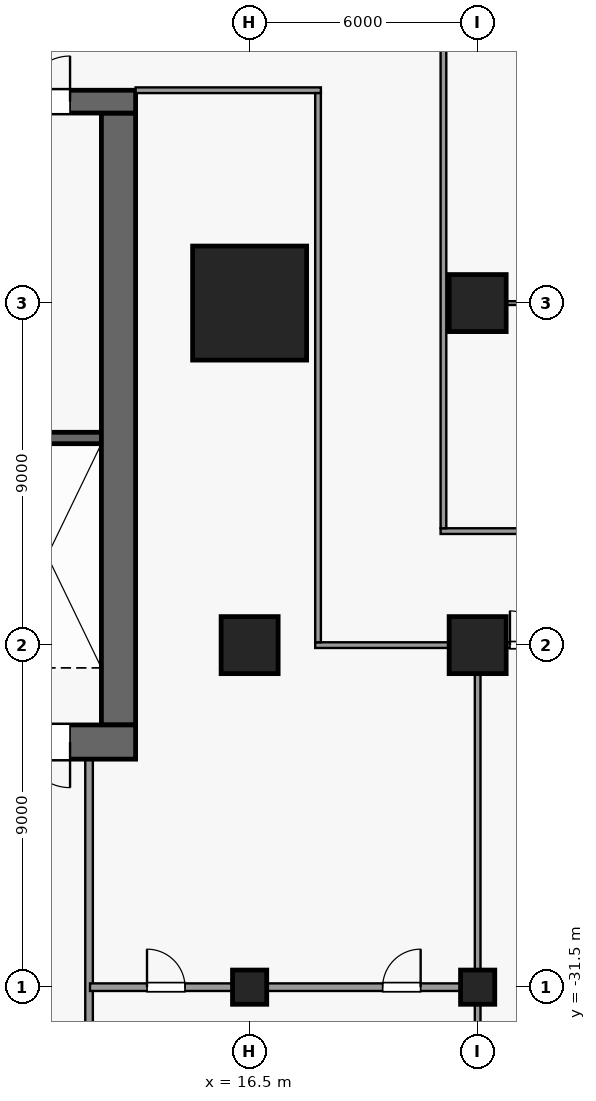
"""IFC4 building model, lengths in metres.
Left out: names, types, materials, properties, quantities, classifications, styles, units other than length and angle.
Written with IfcOpenShell. Run it as: python <this file> out.ifc"""

import sys

from ifc_helpers import new_model, si_unit, direction, frame, frame_2d, origin, origin_2d, place, context, subcontext, project, spatial, rectangle, extrude, element, fill, save


model = new_model("IFC4")
c1 = context("Model", 3, precision=1e-05, world=origin(), true_north=direction((0.0, 1.0)))
c2 = subcontext(c1, "Body", "Model", "MODEL_VIEW")
j1 = project(units=[si_unit("LENGTHUNIT", "METRE"), si_unit("PLANEANGLEUNIT", "RADIAN")], contexts=[c1])
p1 = place(None, origin())
s1 = spatial("IfcSite", under=j1, at=p1, CompositionType="ELEMENT")
p2 = place(p1, origin())
s2 = spatial("IfcBuilding", under=s1, at=p2, CompositionType="ELEMENT")
p3 = place(p2, origin())
s3 = spatial("IfcBuildingStorey", under=s2, at=p3, CompositionType="ELEMENT", Elevation=0.0)
p4 = place(p3, frame((16.5, -31.5, 0.0), z_axis=(0.0, 0.0, 1.0), x_axis=(1.0, 0.0, 0.0)))
e1 = element("IfcColumn", 1, at=p4, inside=s3, PredefinedType="COLUMN", context=c2, shape_type="SweptSolid", body=[
    extrude(rectangle(XDim=0.9, YDim=0.9, at=origin_2d()), origin(), (0.0, 0.0, 1.0), 8.0),
])
p5 = place(p3, frame((16.5, -22.5, 0.0), z_axis=(0.0, 0.0, 1.0), x_axis=(1.0, 0.0, 0.0)))
e2 = element("IfcColumn", 2, at=p5, inside=s3, PredefinedType="COLUMN", context=c2, shape_type="SweptSolid", body=[
    extrude(rectangle(XDim=1.5, YDim=1.5, at=origin_2d()), origin(), (0.0, 0.0, 1.0), 8.0),
])
p6 = place(p3, frame((16.5, -13.5, 0.0), z_axis=(0.0, 0.0, 1.0), x_axis=(1.0, 0.0, 0.0)))
e3 = element("IfcColumn", 3, at=p6, inside=s3, PredefinedType="COLUMN", context=c2, shape_type="SweptSolid", body=[
    extrude(rectangle(XDim=3.0, YDim=3.0, at=origin_2d()), origin(), (0.0, 0.0, 1.0), 8.0),
])
p7 = place(p3, frame((22.5, -31.5, 0.0), z_axis=(0.0, 0.0, 1.0), x_axis=(1.0, 0.0, 0.0)))
e4 = element("IfcColumn", 4, at=p7, inside=s3, PredefinedType="COLUMN", context=c2, shape_type="SweptSolid", body=[
    extrude(rectangle(XDim=0.9, YDim=0.9, at=origin_2d()), origin(), (0.0, 0.0, 1.0), 8.0),
])
for number, where, z_axis, x_axis in (
    (5, (22.5, -22.5, 0.0), (0.0, 0.0, 1.0), (1.0, 0.0, 0.0)),
    (6, (22.5, -13.5, 0.0), (0.0, 0.0, 1.0), (1.0, 0.0, 0.0)),
):
    element("IfcColumn", number, at=place(p3, frame(where, z_axis=z_axis, x_axis=x_axis)), inside=s3, PredefinedType="COLUMN", context=c2, shape_type="SweptSolid", body=[
        extrude(rectangle(XDim=1.5, YDim=1.5, at=origin_2d()), origin(), (0.0, 0.0, 1.0), 8.0),
    ])
p8 = place(p3, frame((13.5, -25.05, 0.0), z_axis=(0.0, 0.0, 1.0), x_axis=(-1.0, 0.0, 0.0)))
e7 = element("IfcWall", 7, at=p8, inside=s3, PredefinedType="SHEAR", context=c2, shape_type="SweptSolid", body=[
    extrude(rectangle(XDim=27.0, YDim=0.9, at=frame_2d((13.5, 0.0))), origin(), (0.0, 0.0, 1.0), 7.65),
])
p9 = place(p8, frame((24.075, 0.0, 0.0)))
e8 = element("IfcOpeningElement", 8, at=p9, cuts=e7, PredefinedType="OPENING", context=c2, shape_type="SweptSolid", body=[
    extrude(rectangle(XDim=1.2, YDim=2.1, at=frame_2d((0.6, 1.05))), frame((0.0, 0.46, 0.0), z_axis=(0.0, -1.0, 0.0), x_axis=(1.0, 0.0, 0.0)), (0.0, 0.0, 1.0), 0.92),
])
p10 = place(p8, frame((1.725, 0.0, 0.0)))
e9 = element("IfcOpeningElement", 9, at=p10, cuts=e7, PredefinedType="OPENING", context=c2, shape_type="SweptSolid", body=[
    extrude(rectangle(XDim=1.2, YDim=2.1, at=frame_2d((0.6, 1.05))), frame((0.0, 0.46, 0.0), z_axis=(0.0, -1.0, 0.0), x_axis=(1.0, 0.0, 0.0)), (0.0, 0.0, 1.0), 0.92),
])
p11 = place(p3, frame((-13.5, -8.2, 0.0), z_axis=(0.0, 0.0, 1.0), x_axis=(1.0, 0.0, 0.0)))
e10 = element("IfcWall", 10, at=p11, inside=s3, PredefinedType="SHEAR", context=c2, shape_type="SweptSolid", body=[
    extrude(rectangle(XDim=27.0, YDim=0.6, at=frame_2d((13.5, 0.0))), origin(), (0.0, 0.0, 1.0), 7.65),
])
p12 = place(p11, frame((7.8, 0.0, 0.0)))
e11 = element("IfcOpeningElement", 11, at=p12, cuts=e10, PredefinedType="OPENING", context=c2, shape_type="SweptSolid", body=[
    extrude(rectangle(XDim=1.8, YDim=2.1, at=frame_2d((0.9, 1.05))), frame((0.0, 0.31, 0.0), z_axis=(0.0, -1.0, 0.0), x_axis=(1.0, 0.0, 0.0)), (0.0, 0.0, 1.0), 0.62),
])
p13 = place(p11, frame((17.4, 0.0, 0.0)))
e12 = element("IfcOpeningElement", 12, at=p13, cuts=e10, PredefinedType="OPENING", context=c2, shape_type="SweptSolid", body=[
    extrude(rectangle(XDim=1.8, YDim=2.1, at=frame_2d((0.9, 1.05))), frame((0.0, 0.31, 0.0), z_axis=(0.0, -1.0, 0.0), x_axis=(1.0, 0.0, 0.0)), (0.0, 0.0, 1.0), 0.62),
])
p14 = place(p11, frame((2.725, 0.0, 0.0)))
e13 = element("IfcOpeningElement", 13, at=p14, cuts=e10, PredefinedType="OPENING", context=c2, shape_type="SweptSolid", body=[
    extrude(rectangle(XDim=0.9, YDim=2.1, at=frame_2d((0.45, 1.05))), frame((0.0, 0.31, 0.0), z_axis=(0.0, -1.0, 0.0), x_axis=(1.0, 0.0, 0.0)), (0.0, 0.0, 1.0), 0.62),
])
p15 = place(p11, frame((24.075, 0.0, 0.0)))
e14 = element("IfcOpeningElement", 14, at=p15, cuts=e10, PredefinedType="OPENING", context=c2, shape_type="SweptSolid", body=[
    extrude(rectangle(XDim=1.2, YDim=2.1, at=frame_2d((0.6, 1.05))), frame((0.0, 0.31, 0.0), z_axis=(0.0, -1.0, 0.0), x_axis=(1.0, 0.0, 0.0)), (0.0, 0.0, 1.0), 0.62),
])
p16 = place(p3, frame((13.05, -24.6, 0.0), z_axis=(0.0, 0.0, 1.0), x_axis=(0.0, 1.0, 0.0)))
e15 = element("IfcWall", 15, at=p16, inside=s3, PredefinedType="SHEAR", context=c2, shape_type="SweptSolid", body=[
    extrude(rectangle(XDim=16.1, YDim=0.9, at=frame_2d((8.05, 0.0))), origin(), (0.0, 0.0, 1.0), 7.65),
])
p17 = place(p3, frame((9.5, -17.05, 0.0), z_axis=(0.0, 0.0, 1.0), x_axis=(1.0, 0.0, 0.0)))
e16 = element("IfcWall", 16, at=p17, inside=s3, PredefinedType="SHEAR", context=c2, shape_type="SweptSolid", body=[
    extrude(rectangle(XDim=3.1, YDim=0.3, at=frame_2d((1.55, 0.0))), origin(), (0.0, 0.0, 1.0), 7.65),
])
p18 = place(p3, frame((12.275, -34.35, 0.0), z_axis=(0.0, 0.0, 1.0), x_axis=(0.0, 1.0, 0.0)))
e17 = element("IfcWall", 17, at=p18, inside=s3, PredefinedType="PARTITIONING", context=c2, shape_type="SweptSolid", body=[
    extrude(rectangle(XDim=8.85, YDim=0.2, at=frame_2d((4.425, 0.0))), origin(), (0.0, 0.0, 1.0), 7.65),
])
p19 = place(p18, frame((0.85, 0.0, 0.0)))
e18 = element("IfcOpeningElement", 18, at=p19, cuts=e17, PredefinedType="OPENING", context=c2, shape_type="SweptSolid", body=[
    extrude(rectangle(XDim=1.0, YDim=2.1, at=frame_2d((0.5, 1.05))), frame((0.0, 0.11, 0.0), z_axis=(0.0, -1.0, 0.0), x_axis=(1.0, 0.0, 0.0)), (0.0, 0.0, 1.0), 0.22),
])
p20 = place(p3, frame((18.225, -22.5, 0.0), z_axis=(0.0, 0.0, 1.0), x_axis=(1.0, 0.0, 0.0)))
e19 = element("IfcWall", 19, at=p20, inside=s3, PredefinedType="PARTITIONING", context=c2, shape_type="SweptSolid", body=[
    extrude(rectangle(XDim=3.525, YDim=0.15, at=frame_2d((1.762, 0.0))), origin(), (0.0, 0.0, 1.0), 7.65),
])
p21 = place(p3, frame((23.25, -22.5, 0.0), z_axis=(0.0, 0.0, 1.0), x_axis=(1.0, 0.0, 0.0)))
e20 = element("IfcWall", 20, at=p21, inside=s3, PredefinedType="PARTITIONING", context=c2, shape_type="SweptSolid", body=[
    extrude(rectangle(XDim=7.8, YDim=0.15, at=frame_2d((3.9, 0.0))), origin(), (0.0, 0.0, 1.0), 7.65),
])
p22 = place(p21, frame((0.1, 0.0, 0.0)))
e21 = element("IfcOpeningElement", 21, at=p22, cuts=e20, PredefinedType="OPENING", context=c2, shape_type="SweptSolid", body=[
    extrude(rectangle(XDim=1.8, YDim=2.1, at=frame_2d((0.9, 1.05))), frame((0.0, 0.085, 0.0), z_axis=(0.0, -1.0, 0.0), x_axis=(1.0, 0.0, 0.0)), (0.0, 0.0, 1.0), 0.17),
])
p23 = place(p3, frame((21.525, -19.5, 0.0), z_axis=(0.0, 0.0, 1.0), x_axis=(1.0, 0.0, 0.0)))
e22 = element("IfcWall", 22, at=p23, inside=s3, PredefinedType="PARTITIONING", context=c2, shape_type="SweptSolid", body=[
    extrude(rectangle(XDim=28.05, YDim=0.15, at=frame_2d((14.025, 0.0))), origin(), (0.0, 0.0, 1.0), 7.65),
])
p24 = place(p3, frame((13.5, -7.9, 0.0), z_axis=(0.0, 0.0, 1.0), x_axis=(1.0, 0.0, 0.0)))
e23 = element("IfcWall", 23, at=p24, inside=s3, PredefinedType="PARTITIONING", context=c2, shape_type="SweptSolid", body=[
    extrude(rectangle(XDim=4.875, YDim=0.15, at=frame_2d((2.438, 0.0))), origin(), (0.0, 0.0, 1.0), 7.65),
])
p25 = place(p3, frame((18.3, -22.425, 0.0), z_axis=(0.0, 0.0, 1.0), x_axis=(0.0, 1.0, 0.0)))
e24 = element("IfcWall", 24, at=p25, inside=s3, PredefinedType="PARTITIONING", context=c2, shape_type="SweptSolid", body=[
    extrude(rectangle(XDim=14.45, YDim=0.15, at=frame_2d((7.225, 0.0))), origin(), (0.0, 0.0, 1.0), 7.65),
])
p26 = place(p3, frame((21.6, -19.425, 0.0), z_axis=(0.0, 0.0, 1.0), x_axis=(0.0, 1.0, 0.0)))
e25 = element("IfcWall", 25, at=p26, inside=s3, PredefinedType="PARTITIONING", context=c2, shape_type="SweptSolid", body=[
    extrude(rectangle(XDim=13.75, YDim=0.15, at=frame_2d((6.875, 0.0))), origin(), (0.0, 0.0, 1.0), 7.65),
])
p27 = place(p3, frame((22.5, -34.225, 0.0), z_axis=(0.0, 0.0, 1.0), x_axis=(0.0, 1.0, 0.0)))
e26 = element("IfcWall", 26, at=p27, inside=s3, PredefinedType="PARTITIONING", context=c2, shape_type="SweptSolid", body=[
    extrude(rectangle(XDim=2.275, YDim=0.15, at=frame_2d((1.138, 0.0))), origin(), (0.0, 0.0, 1.0), 7.65),
])
p28 = place(p3, frame((22.5, -31.05, 0.0), z_axis=(0.0, 0.0, 1.0), x_axis=(0.0, 1.0, 0.0)))
e27 = element("IfcWall", 27, at=p28, inside=s3, PredefinedType="PARTITIONING", context=c2, shape_type="SweptSolid", body=[
    extrude(rectangle(XDim=7.8, YDim=0.15, at=frame_2d((3.9, 0.0))), origin(), (0.0, 0.0, 1.0), 7.65),
])
p29 = place(p3, frame((12.3, -31.5, 0.0), z_axis=(0.0, 0.0, 1.0), x_axis=(1.0, 0.0, 0.0)))
e28 = element("IfcWall", 28, at=p29, inside=s3, PredefinedType="PARTITIONING", context=c2, shape_type="SweptSolid", body=[
    extrude(rectangle(XDim=10.2, YDim=0.2, at=frame_2d((5.1, 0.0))), origin(), (0.0, 0.0, 1.0), 7.65),
])
p30 = place(p29, frame((1.5, 0.0, 0.0)))
e29 = element("IfcOpeningElement", 29, at=p30, cuts=e28, PredefinedType="OPENING", context=c2, shape_type="SweptSolid", body=[
    extrude(rectangle(XDim=1.0, YDim=2.1, at=frame_2d((0.5, 1.05))), frame((0.0, 0.11, 0.0), z_axis=(0.0, -1.0, 0.0), x_axis=(1.0, 0.0, 0.0)), (0.0, 0.0, 1.0), 0.22),
])
p31 = place(p29, frame((7.7, 0.0, 0.0)))
e30 = element("IfcOpeningElement", 30, at=p31, cuts=e28, PredefinedType="OPENING", context=c2, shape_type="SweptSolid", body=[
    extrude(rectangle(XDim=1.0, YDim=2.1, at=frame_2d((0.5, 1.05))), frame((0.0, 0.11, 0.0), z_axis=(0.0, -1.0, 0.0), x_axis=(1.0, 0.0, 0.0)), (0.0, 0.0, 1.0), 0.22),
])
p32 = place(p3, frame((21.6, -13.5, 0.0), z_axis=(0.0, 0.0, 1.0), x_axis=(1.0, 0.0, 0.0)))
e31 = element("IfcWall", 31, at=p32, inside=s3, PredefinedType="PARTITIONING", context=c2, shape_type="SweptSolid", body=[
    extrude(rectangle(XDim=9.8, YDim=0.1, at=frame_2d((4.9, 0.0))), origin(), (0.0, 0.0, 1.0), 7.65),
])
p33 = place(p10, origin())
e32 = element("IfcDoor", 32, at=p33, inside=s3, OperationType="SINGLE_SWING_LEFT", PredefinedType="DOOR", context=c2, shape_type="SweptSolid", body=[
    extrude(rectangle(XDim=1.2, YDim=2.1, at=frame_2d((0.6, 1.05))), frame((0.0, 0.025, 0.0), z_axis=(0.0, -1.0, 0.0), x_axis=(1.0, 0.0, 0.0)), (0.0, 0.0, 1.0), 0.05),
])
fill(e9, e32)
p34 = place(p15, origin())
e33 = element("IfcDoor", 33, at=p34, inside=s3, OperationType="SINGLE_SWING_RIGHT", PredefinedType="DOOR", context=c2, shape_type="SweptSolid", body=[
    extrude(rectangle(XDim=1.2, YDim=2.1, at=frame_2d((0.6, 1.05))), frame((0.0, 0.025, 0.0), z_axis=(0.0, -1.0, 0.0), x_axis=(1.0, 0.0, 0.0)), (0.0, 0.0, 1.0), 0.05),
])
fill(e14, e33)
p35 = place(p22, origin())
e34 = element("IfcDoor", 34, at=p35, inside=s3, OperationType="DOUBLE_DOOR_SINGLE_SWING", PredefinedType="DOOR", context=c2, shape_type="SweptSolid", body=[
    extrude(rectangle(XDim=1.8, YDim=2.1, at=frame_2d((0.9, 1.05))), frame((0.0, 0.025, 0.0), z_axis=(0.0, -1.0, 0.0), x_axis=(1.0, 0.0, 0.0)), (0.0, 0.0, 1.0), 0.05),
])
fill(e21, e34)
p36 = place(p30, origin())
e35 = element("IfcDoor", 35, at=p36, inside=s3, OperationType="SINGLE_SWING_RIGHT", PredefinedType="DOOR", context=c2, shape_type="SweptSolid", body=[
    extrude(rectangle(XDim=1.0, YDim=2.1, at=frame_2d((0.5, 1.05))), frame((0.0, 0.025, 0.0), z_axis=(0.0, -1.0, 0.0), x_axis=(1.0, 0.0, 0.0)), (0.0, 0.0, 1.0), 0.05),
])
fill(e29, e35)
p37 = place(p31, origin())
e36 = element("IfcDoor", 36, at=p37, inside=s3, OperationType="SINGLE_SWING_LEFT", PredefinedType="DOOR", context=c2, shape_type="SweptSolid", body=[
    extrude(rectangle(XDim=1.0, YDim=2.1, at=frame_2d((0.5, 1.05))), frame((0.0, 0.025, 0.0), z_axis=(0.0, -1.0, 0.0), x_axis=(1.0, 0.0, 0.0)), (0.0, 0.0, 1.0), 0.05),
])
fill(e30, e36)
save(model, sys.argv[1])
